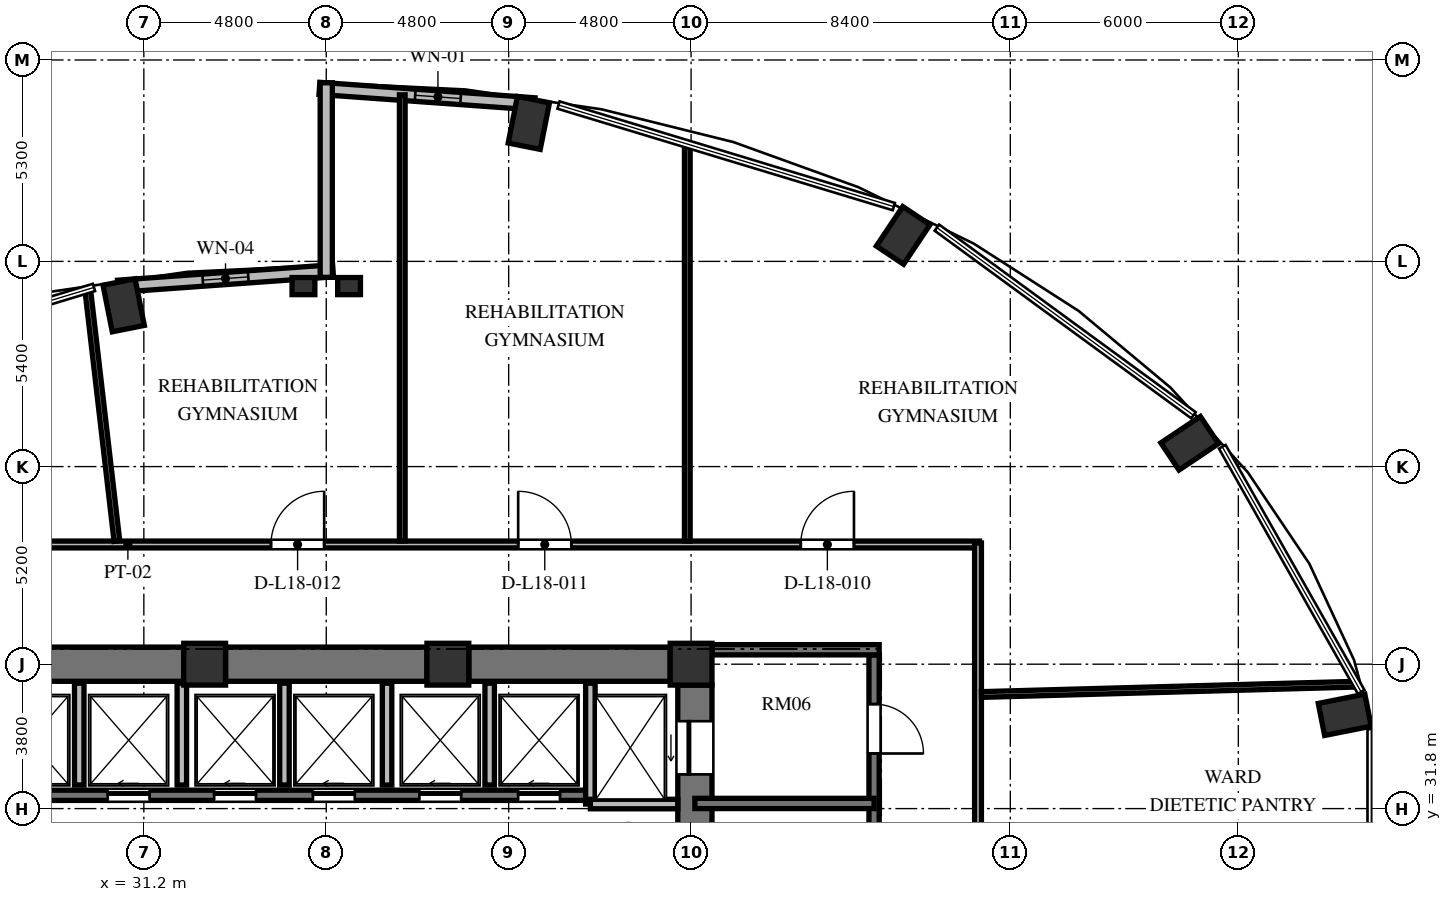
"""IFC4 building model, lengths in metres.
Left out: names, types, materials, properties, quantities, classifications, styles, units other than length and angle.
Written with IfcOpenShell. Run it as: python <this file> out.ifc"""

import sys

from ifc_helpers import new_model, si_unit, direction, frame, frame_2d, origin, origin_2d, place, context, subcontext, project, spatial, rectangle, extrude, element, fill, save


model = new_model("IFC4")
c1 = context("Model", 3, precision=1e-05, world=origin(), true_north=direction((0.0, 1.0)))
c2 = subcontext(c1, "Body", "Model", "MODEL_VIEW")
j1 = project(units=[si_unit("LENGTHUNIT", "METRE"), si_unit("PLANEANGLEUNIT", "RADIAN")], contexts=[c1])
p1 = place(None, origin())
s1 = spatial("IfcSite", under=j1, at=p1, CompositionType="ELEMENT")
p2 = place(p1, origin())
s2 = spatial("IfcBuilding", under=s1, at=p2, CompositionType="ELEMENT")
p3 = place(p2, frame((0.0, 0.0, 72.624)))
s3 = spatial("IfcBuildingStorey", under=s2, at=p3, CompositionType="ELEMENT", Elevation=72.624)
for number, where, z_axis, x_axis in (
    (1, (62.8, 34.268, 0.0), (0.0, 0.0, 1.0), (0.981, 0.195, 0.0)),
    (2, (58.72, 41.414, 0.0), (0.0, 0.0, 1.0), (0.831, 0.556, 0.0)),
    (3, (51.181, 46.884, 0.0), (0.0, 0.0, 1.0), (0.556, 0.831, 0.0)),
    (4, (41.331, 49.844, 0.0), (0.0, 0.0, 1.0), (0.195, 0.981, 0.0)),
    (5, (30.669, 45.044, 0.0), (0.0, 0.0, 1.0), (-0.195, 0.981, 0.0)),
):
    element("IfcColumn", number, at=place(p3, frame(where, z_axis=z_axis, x_axis=x_axis)), inside=s3, PredefinedType="COLUMN", context=c2, shape_type="SweptSolid", body=[
        extrude(rectangle(XDim=1.25, YDim=0.86, at=origin_2d()), origin(), (0.0, 0.0, 1.0), 3.648),
    ])
for number, where, z_axis, x_axis in (
    (6, (45.6, 35.6, 0.0), (0.0, 0.0, 1.0), (1.0, 0.0, 0.0)),
    (7, (39.2, 35.6, 0.0), (0.0, 0.0, 1.0), (1.0, 0.0, 0.0)),
    (8, (32.8, 35.6, 0.0), (0.0, 0.0, 1.0), (1.0, 0.0, 0.0)),
):
    element("IfcColumn", number, at=place(p3, frame(where, z_axis=z_axis, x_axis=x_axis)), inside=s3, PredefinedType="COLUMN", context=c2, shape_type="SweptSolid", body=[
        extrude(rectangle(XDim=1.1, YDim=1.1, at=origin_2d()), origin(), (0.0, 0.0, 1.0), 3.648),
    ])
for number, where, z_axis, x_axis in (
    (9, (35.4, 45.55, 0.0), (0.0, 0.0, 1.0), (1.0, 0.0, 0.0)),
    (10, (36.6, 45.55, 0.0), (0.0, 0.0, 1.0), (1.0, 0.0, 0.0)),
):
    element("IfcColumn", number, at=place(p3, frame(where, z_axis=z_axis, x_axis=x_axis)), inside=s3, PredefinedType="PILASTER", context=c2, shape_type="SweptSolid", body=[
        extrude(rectangle(XDim=0.6, YDim=0.45, at=origin_2d()), origin(), (0.0, 0.0, 1.0), 3.648),
    ])
p4 = place(p3, frame((45.7, 20.95, 0.0), z_axis=(0.0, 0.0, 1.0), x_axis=(0.0, 1.0, 0.0)))
e11 = element("IfcWall", 11, at=p4, inside=s3, PredefinedType="SHEAR", context=c2, shape_type="SweptSolid", body=[
    extrude(rectangle(XDim=14.1, YDim=0.9, at=frame_2d((7.05, 0.0))), origin(), (0.0, 0.0, 1.0), 3.648),
])
p5 = place(p4, frame((11.75, 0.0, 0.0)))
e12 = element("IfcOpeningElement", 12, at=p5, cuts=e11, PredefinedType="OPENING", context=c2, shape_type="SweptSolid", body=[
    extrude(rectangle(XDim=1.4, YDim=2.3, at=frame_2d((0.7, 1.15))), frame((0.0, 0.46, 0.0), z_axis=(0.0, -1.0, 0.0), x_axis=(1.0, 0.0, 0.0)), (0.0, 0.0, 1.0), 0.92),
])
p6 = place(p4, frame((0.95, 0.0, 0.0)))
e13 = element("IfcOpeningElement", 13, at=p6, cuts=e11, PredefinedType="OPENING", context=c2, shape_type="SweptSolid", body=[
    extrude(rectangle(XDim=1.4, YDim=2.3, at=frame_2d((0.7, 1.15))), frame((0.0, 0.46, 0.0), z_axis=(0.0, -1.0, 0.0), x_axis=(1.0, 0.0, 0.0)), (0.0, 0.0, 1.0), 0.92),
])
p7 = place(p3, frame((26.95, 35.6, 0.0), z_axis=(0.0, 0.0, 1.0), x_axis=(1.0, 0.0, 0.0)))
e14 = element("IfcWall", 14, at=p7, inside=s3, PredefinedType="SHEAR", context=c2, shape_type="SweptSolid", body=[
    extrude(rectangle(XDim=5.3, YDim=0.9, at=frame_2d((2.65, 0.0))), origin(), (0.0, 0.0, 1.0), 3.648),
])
p8 = place(p3, frame((33.35, 35.6, 0.0), z_axis=(0.0, 0.0, 1.0), x_axis=(1.0, 0.0, 0.0)))
e15 = element("IfcWall", 15, at=p8, inside=s3, PredefinedType="SHEAR", context=c2, shape_type="SweptSolid", body=[
    extrude(rectangle(XDim=5.3, YDim=0.9, at=frame_2d((2.65, 0.0))), origin(), (0.0, 0.0, 1.0), 3.648),
])
p9 = place(p3, frame((39.75, 35.6, 0.0), z_axis=(0.0, 0.0, 1.0), x_axis=(1.0, 0.0, 0.0)))
e16 = element("IfcWall", 16, at=p9, inside=s3, PredefinedType="SHEAR", context=c2, shape_type="SweptSolid", body=[
    extrude(rectangle(XDim=5.3, YDim=0.9, at=frame_2d((2.65, 0.0))), origin(), (0.0, 0.0, 1.0), 3.648),
])
p10 = place(p3, frame((41.481, 50.346, 0.0), z_axis=(0.0, 0.0, 1.0), x_axis=(-0.997422321809, 0.071754525696, 0.0)))
e17 = element("IfcWall", 17, at=p10, inside=s3, PredefinedType="SOLIDWALL", context=c2, shape_type="SweptSolid", body=[
    extrude(rectangle(XDim=5.675, YDim=0.32, at=frame_2d((2.838, 0.0))), origin(), (0.0, 0.0, 1.0), 3.198),
])
p11 = place(p10, frame((1.949, 0.0, 0.85)))
e18 = element("IfcOpeningElement", 18, at=p11, cuts=e17, PredefinedType="OPENING", context=c2, shape_type="SweptSolid", body=[
    extrude(rectangle(XDim=1.2, YDim=2.2, at=frame_2d((0.6, 1.1))), frame((0.0, 0.17, 0.0), z_axis=(0.0, -1.0, 0.0), x_axis=(1.0, 0.0, 0.0)), (0.0, 0.0, 1.0), 0.34),
])
p12 = place(p3, frame((36.179, 45.953, 0.0), z_axis=(0.0, 0.0, 1.0), x_axis=(-0.997421878774, -0.071760683825, 0.0)))
e19 = element("IfcWall", 19, at=p12, inside=s3, PredefinedType="SOLIDWALL", context=c2, shape_type="SweptSolid", body=[
    extrude(rectangle(XDim=5.675, YDim=0.32, at=frame_2d((2.837, 0.0))), origin(), (0.0, 0.0, 1.0), 3.198),
])
p13 = place(p12, frame((2.237, 0.0, 0.85)))
e20 = element("IfcOpeningElement", 20, at=p13, cuts=e19, PredefinedType="OPENING", context=c2, shape_type="SweptSolid", body=[
    extrude(rectangle(XDim=1.2, YDim=1.8, at=frame_2d((0.6, 0.9))), frame((0.0, 0.17, 0.0), z_axis=(0.0, -1.0, 0.0), x_axis=(1.0, 0.0, 0.0)), (0.0, 0.0, 1.0), 0.34),
])
p14 = place(p3, frame((36.0, 50.9, 0.0), z_axis=(0.0, 0.0, 1.0), x_axis=(0.0, -1.0, 0.0)))
e21 = element("IfcWall", 21, at=p14, inside=s3, PredefinedType="SOLIDWALL", context=c2, shape_type="SweptSolid", body=[
    extrude(rectangle(XDim=5.12, YDim=0.32, at=frame_2d((2.56, 0.0))), origin(), (0.0, 0.0, 1.0), 3.198),
])
p15 = place(p3, frame((26.55, 32.15, 0.0), z_axis=(0.0, 0.0, 1.0), x_axis=(1.0, 0.0, 0.0)))
e22 = element("IfcWall", 22, at=p15, inside=s3, PredefinedType="SHEAR", context=c2, shape_type="SweptSolid", body=[
    extrude(rectangle(XDim=16.4, YDim=0.27, at=frame_2d((8.2, 0.0))), origin(), (0.0, 0.0, 1.0), 3.648),
])
p16 = place(p15, frame((1.1, 0.0, 0.0)))
e23 = element("IfcOpeningElement", 23, at=p16, cuts=e22, PredefinedType="OPENING", context=c2, shape_type="SweptSolid", body=[
    extrude(rectangle(XDim=1.1, YDim=2.2, at=frame_2d((0.55, 1.1))), frame((0.0, 0.145, 0.0), z_axis=(0.0, -1.0, 0.0), x_axis=(1.0, 0.0, 0.0)), (0.0, 0.0, 1.0), 0.29),
])
p17 = place(p15, frame((3.7, 0.0, 0.0)))
e24 = element("IfcOpeningElement", 24, at=p17, cuts=e22, PredefinedType="OPENING", context=c2, shape_type="SweptSolid", body=[
    extrude(rectangle(XDim=1.1, YDim=2.2, at=frame_2d((0.55, 1.1))), frame((0.0, 0.145, 0.0), z_axis=(0.0, -1.0, 0.0), x_axis=(1.0, 0.0, 0.0)), (0.0, 0.0, 1.0), 0.29),
])
p18 = place(p15, frame((6.5, 0.0, 0.0)))
e25 = element("IfcOpeningElement", 25, at=p18, cuts=e22, PredefinedType="OPENING", context=c2, shape_type="SweptSolid", body=[
    extrude(rectangle(XDim=1.1, YDim=2.2, at=frame_2d((0.55, 1.1))), frame((0.0, 0.145, 0.0), z_axis=(0.0, -1.0, 0.0), x_axis=(1.0, 0.0, 0.0)), (0.0, 0.0, 1.0), 0.29),
])
p19 = place(p15, frame((9.1, 0.0, 0.0)))
e26 = element("IfcOpeningElement", 26, at=p19, cuts=e22, PredefinedType="OPENING", context=c2, shape_type="SweptSolid", body=[
    extrude(rectangle(XDim=1.1, YDim=2.2, at=frame_2d((0.55, 1.1))), frame((0.0, 0.145, 0.0), z_axis=(0.0, -1.0, 0.0), x_axis=(1.0, 0.0, 0.0)), (0.0, 0.0, 1.0), 0.29),
])
p20 = place(p15, frame((11.9, 0.0, 0.0)))
e27 = element("IfcOpeningElement", 27, at=p20, cuts=e22, PredefinedType="OPENING", context=c2, shape_type="SweptSolid", body=[
    extrude(rectangle(XDim=1.1, YDim=2.2, at=frame_2d((0.55, 1.1))), frame((0.0, 0.145, 0.0), z_axis=(0.0, -1.0, 0.0), x_axis=(1.0, 0.0, 0.0)), (0.0, 0.0, 1.0), 0.29),
])
p21 = place(p15, frame((14.5, 0.0, 0.0)))
e28 = element("IfcOpeningElement", 28, at=p21, cuts=e22, PredefinedType="OPENING", context=c2, shape_type="SweptSolid", body=[
    extrude(rectangle(XDim=1.1, YDim=2.2, at=frame_2d((0.55, 1.1))), frame((0.0, 0.145, 0.0), z_axis=(0.0, -1.0, 0.0), x_axis=(1.0, 0.0, 0.0)), (0.0, 0.0, 1.0), 0.29),
])
p22 = place(p3, frame((42.95, 31.92, 0.0), z_axis=(0.0, 0.0, 1.0), x_axis=(0.0, 1.0, 0.0)))
e29 = element("IfcWall", 29, at=p22, inside=s3, PredefinedType="SOLIDWALL", context=c2, shape_type="SweptSolid", body=[
    extrude(rectangle(XDim=3.18, YDim=0.25, at=frame_2d((1.59, 0.0))), origin(), (0.0, 0.0, 1.0), 3.198),
])
p23 = place(p3, frame((42.95, 31.92, 0.0), z_axis=(0.0, 0.0, 1.0), x_axis=(1.0, 0.0, 0.0)))
e30 = element("IfcWall", 30, at=p23, inside=s3, PredefinedType="SOLIDWALL", context=c2, shape_type="SweptSolid", body=[
    extrude(rectangle(XDim=2.3, YDim=0.25, at=frame_2d((1.15, 0.0))), origin(), (0.0, 0.0, 1.0), 3.198),
])
for number, where, z_axis, x_axis in (
    (31, (29.5, 32.42, 0.0), (0.0, 0.0, 1.0), (0.0, 1.0, 0.0)),
    (32, (32.2, 32.42, 0.0), (0.0, 0.0, 1.0), (0.0, 1.0, 0.0)),
    (33, (34.9, 32.42, 0.0), (0.0, 0.0, 1.0), (0.0, 1.0, 0.0)),
    (34, (37.6, 32.42, 0.0), (0.0, 0.0, 1.0), (0.0, 1.0, 0.0)),
    (35, (40.3, 32.42, 0.0), (0.0, 0.0, 1.0), (0.0, 1.0, 0.0)),
):
    element("IfcWall", number, at=place(p3, frame(where, z_axis=z_axis, x_axis=x_axis)), inside=s3, PredefinedType="SOLIDWALL", context=c2, shape_type="SweptSolid", body=[
        extrude(rectangle(XDim=2.68, YDim=0.25, at=frame_2d((1.34, 0.0))), origin(), (0.0, 0.0, 1.0), 3.198),
    ])
p24 = place(p3, frame((50.415, 35.845, 0.0), z_axis=(0.0, 0.0, 1.0), x_axis=(0.0, -1.0, 0.0)))
e36 = element("IfcWall", 36, at=p24, inside=s3, PredefinedType="SHEAR", context=c2, shape_type="SweptSolid", body=[
    extrude(rectangle(XDim=15.825, YDim=0.27, at=frame_2d((7.913, 0.0))), origin(), (0.0, 0.0, 1.0), 3.648),
])
p25 = place(p24, frame((4.445, 0.0, 0.0)))
e37 = element("IfcOpeningElement", 37, at=p25, cuts=e36, PredefinedType="OPENING", context=c2, shape_type="SweptSolid", body=[
    extrude(rectangle(XDim=1.2, YDim=2.15, at=frame_2d((0.6, 1.075))), frame((0.0, 0.145, 0.0), z_axis=(0.0, -1.0, 0.0), x_axis=(1.0, 0.0, 0.0)), (0.0, 0.0, 1.0), 0.29),
])
p26 = place(p24, frame((1.295, 0.0, 0.0)))
e38 = element("IfcOpeningElement", 38, at=p26, cuts=e36, PredefinedType="OPENING", context=c2, shape_type="SweptSolid", body=[
    extrude(rectangle(XDim=1.3, YDim=2.2, at=frame_2d((0.65, 1.1))), frame((0.0, 0.145, 0.0), z_axis=(0.0, -1.0, 0.0), x_axis=(1.0, 0.0, 0.0)), (0.0, 0.0, 1.0), 0.29),
])
p27 = place(p24, frame((13.095, 0.0, 0.0)))
e39 = element("IfcOpeningElement", 39, at=p27, cuts=e36, PredefinedType="OPENING", context=c2, shape_type="SweptSolid", body=[
    extrude(rectangle(XDim=1.3, YDim=2.2, at=frame_2d((0.65, 1.1))), frame((0.0, 0.145, 0.0), z_axis=(0.0, -1.0, 0.0), x_axis=(1.0, 0.0, 0.0)), (0.0, 0.0, 1.0), 0.29),
])
p28 = place(p3, frame((46.15, 35.98, 0.0), z_axis=(0.0, 0.0, 1.0), x_axis=(1.0, 0.0, 0.0)))
e40 = element("IfcWall", 40, at=p28, inside=s3, PredefinedType="SHEAR", context=c2, shape_type="SweptSolid", body=[
    extrude(rectangle(XDim=4.4, YDim=0.27, at=frame_2d((2.2, 0.0))), origin(), (0.0, 0.0, 1.0), 3.648),
])
p29 = place(p3, frame((45.7, 31.935, 0.0), z_axis=(0.0, 0.0, 1.0), x_axis=(1.0, 0.0, 0.0)))
e41 = element("IfcWall", 41, at=p29, inside=s3, PredefinedType="SHEAR", context=c2, shape_type="SweptSolid", body=[
    extrude(rectangle(XDim=4.715, YDim=0.27, at=frame_2d((2.357, 0.0))), origin(), (0.0, 0.0, 1.0), 3.648),
])
p30 = place(p3, frame((23.31, 38.75, 0.0), z_axis=(0.0, 0.0, 1.0), x_axis=(1.0, 0.0, 0.0)))
e42 = element("IfcWall", 42, at=p30, inside=s3, PredefinedType="PARTITIONING", context=c2, shape_type="SweptSolid", body=[
    extrude(rectangle(XDim=29.88, YDim=0.18, at=frame_2d((14.94, 0.0))), origin(), (0.0, 0.0, 1.0), 2.823),
])
p31 = place(p30, frame((25.176, 0.0, 0.0)))
e43 = element("IfcOpeningElement", 43, at=p31, cuts=e42, PredefinedType="OPENING", context=c2, shape_type="SweptSolid", body=[
    extrude(rectangle(XDim=1.4, YDim=2.2, at=frame_2d((0.7, 1.1))), frame((0.0, 0.1, 0.0), z_axis=(0.0, -1.0, 0.0), x_axis=(1.0, 0.0, 0.0)), (0.0, 0.0, 1.0), 0.2),
])
p32 = place(p30, frame((17.74, 0.0, 0.0)))
e44 = element("IfcOpeningElement", 44, at=p32, cuts=e42, PredefinedType="OPENING", context=c2, shape_type="SweptSolid", body=[
    extrude(rectangle(XDim=1.4, YDim=2.2, at=frame_2d((0.7, 1.1))), frame((0.0, 0.1, 0.0), z_axis=(0.0, -1.0, 0.0), x_axis=(1.0, 0.0, 0.0)), (0.0, 0.0, 1.0), 0.2),
])
p33 = place(p30, frame((11.236, 0.0, 0.0)))
e45 = element("IfcOpeningElement", 45, at=p33, cuts=e42, PredefinedType="OPENING", context=c2, shape_type="SweptSolid", body=[
    extrude(rectangle(XDim=1.4, YDim=2.2, at=frame_2d((0.7, 1.1))), frame((0.0, 0.1, 0.0), z_axis=(0.0, -1.0, 0.0), x_axis=(1.0, 0.0, 0.0)), (0.0, 0.0, 1.0), 0.2),
])
p34 = place(p3, frame((53.15, 38.79, 0.0), z_axis=(0.0, 0.0, 1.0), x_axis=(0.0, -1.0, 0.0)))
e46 = element("IfcWall", 46, at=p34, inside=s3, PredefinedType="PARTITIONING", context=c2, shape_type="SweptSolid", body=[
    extrude(rectangle(XDim=9.43, YDim=0.18, at=frame_2d((4.715, 0.0))), origin(), (0.0, 0.0, 1.0), 3.198),
])
p35 = place(p3, frame((53.24, 34.802, 0.0), z_axis=(0.0, 0.0, 1.0), x_axis=(0.999620561748, 0.027545099924, 0.0)))
e47 = element("IfcWall", 47, at=p35, inside=s3, PredefinedType="PARTITIONING", context=c2, shape_type="SweptSolid", body=[
    extrude(rectangle(XDim=9.891, YDim=0.15, at=frame_2d((4.946, 0.0))), origin(), (0.0, 0.0, 1.0), 2.583),
])
p36 = place(p3, frame((30.491, 38.84, 0.0), z_axis=(0.0, 0.0, 1.0), x_axis=(-0.115342161953, 0.993325820502, 0.0)))
e48 = element("IfcWall", 48, at=p36, inside=s3, PredefinedType="PARTITIONING", context=c2, shape_type="SweptSolid", body=[
    extrude(rectangle(XDim=6.672, YDim=0.15, at=frame_2d((3.336, 0.0))), origin(), (0.0, 0.0, 1.0), 3.198),
])
p37 = place(p3, frame((38.0, 38.84, 0.0), z_axis=(0.0, 0.0, 1.0), x_axis=(0.0, 1.0, 0.0)))
e49 = element("IfcWall", 49, at=p37, inside=s3, PredefinedType="PARTITIONING", context=c2, shape_type="SweptSolid", body=[
    extrude(rectangle(XDim=11.743, YDim=0.15, at=frame_2d((5.872, 0.0))), origin(), (0.0, 0.0, 1.0), 3.198),
])
p38 = place(p3, frame((45.5, 38.84, 0.0), z_axis=(0.0, 0.0, 1.0), x_axis=(0.0, 1.0, 0.0)))
e50 = element("IfcWall", 50, at=p38, inside=s3, PredefinedType="PARTITIONING", context=c2, shape_type="SweptSolid", body=[
    extrude(rectangle(XDim=10.436, YDim=0.15, at=frame_2d((5.218, 0.0))), origin(), (0.0, 0.0, 1.0), 3.198),
])
p39 = place(p11, origin())
e51 = element("IfcWindow", 51, at=p39, inside=s3, PartitioningType="SINGLE_PANEL", PredefinedType="WINDOW", context=c2, shape_type="SweptSolid", body=[
    extrude(rectangle(XDim=1.2, YDim=2.2, at=frame_2d((0.6, 1.1))), frame((0.0, 0.03, 0.0), z_axis=(0.0, -1.0, 0.0), x_axis=(1.0, 0.0, 0.0)), (0.0, 0.0, 1.0), 0.06),
])
fill(e18, e51)
p40 = place(p13, origin())
e52 = element("IfcWindow", 52, at=p40, inside=s3, PartitioningType="SINGLE_PANEL", PredefinedType="WINDOW", context=c2, shape_type="SweptSolid", body=[
    extrude(rectangle(XDim=1.2, YDim=1.8, at=frame_2d((0.6, 0.9))), frame((0.0, 0.03, 0.0), z_axis=(0.0, -1.0, 0.0), x_axis=(1.0, 0.0, 0.0)), (0.0, 0.0, 1.0), 0.06),
])
fill(e20, e52)
p41 = place(p17, origin())
e53 = element("IfcDoor", 53, at=p41, inside=s3, OperationType="SLIDING_TO_LEFT", PredefinedType="DOOR", context=c2, shape_type="SweptSolid", body=[
    extrude(rectangle(XDim=1.1, YDim=2.2, at=frame_2d((0.55, 1.1))), frame((0.0, 0.025, 0.0), z_axis=(0.0, -1.0, 0.0), x_axis=(1.0, 0.0, 0.0)), (0.0, 0.0, 1.0), 0.05),
])
fill(e24, e53)
p42 = place(p18, origin())
e54 = element("IfcDoor", 54, at=p42, inside=s3, OperationType="SLIDING_TO_LEFT", PredefinedType="DOOR", context=c2, shape_type="SweptSolid", body=[
    extrude(rectangle(XDim=1.1, YDim=2.2, at=frame_2d((0.55, 1.1))), frame((0.0, 0.025, 0.0), z_axis=(0.0, -1.0, 0.0), x_axis=(1.0, 0.0, 0.0)), (0.0, 0.0, 1.0), 0.05),
])
fill(e25, e54)
p43 = place(p19, origin())
e55 = element("IfcDoor", 55, at=p43, inside=s3, OperationType="SLIDING_TO_LEFT", PredefinedType="DOOR", context=c2, shape_type="SweptSolid", body=[
    extrude(rectangle(XDim=1.1, YDim=2.2, at=frame_2d((0.55, 1.1))), frame((0.0, 0.025, 0.0), z_axis=(0.0, -1.0, 0.0), x_axis=(1.0, 0.0, 0.0)), (0.0, 0.0, 1.0), 0.05),
])
fill(e26, e55)
p44 = place(p20, origin())
e56 = element("IfcDoor", 56, at=p44, inside=s3, OperationType="SLIDING_TO_LEFT", PredefinedType="DOOR", context=c2, shape_type="SweptSolid", body=[
    extrude(rectangle(XDim=1.1, YDim=2.2, at=frame_2d((0.55, 1.1))), frame((0.0, 0.025, 0.0), z_axis=(0.0, -1.0, 0.0), x_axis=(1.0, 0.0, 0.0)), (0.0, 0.0, 1.0), 0.05),
])
fill(e27, e56)
p45 = place(p21, origin())
e57 = element("IfcDoor", 57, at=p45, inside=s3, OperationType="SLIDING_TO_LEFT", PredefinedType="DOOR", context=c2, shape_type="SweptSolid", body=[
    extrude(rectangle(XDim=1.1, YDim=2.2, at=frame_2d((0.55, 1.1))), frame((0.0, 0.025, 0.0), z_axis=(0.0, -1.0, 0.0), x_axis=(1.0, 0.0, 0.0)), (0.0, 0.0, 1.0), 0.05),
])
fill(e28, e57)
p46 = place(p5, origin())
e58 = element("IfcDoor", 58, at=p46, inside=s3, OperationType="SLIDING_TO_LEFT", PredefinedType="DOOR", context=c2, shape_type="SweptSolid", body=[
    extrude(rectangle(XDim=1.4, YDim=2.3, at=frame_2d((0.7, 1.15))), frame((0.0, 0.025, 0.0), z_axis=(0.0, -1.0, 0.0), x_axis=(1.0, 0.0, 0.0)), (0.0, 0.0, 1.0), 0.05),
])
fill(e12, e58)
p47 = place(p26, origin())
e59 = element("IfcDoor", 59, at=p47, inside=s3, OperationType="SINGLE_SWING_RIGHT", PredefinedType="DOOR", context=c2, shape_type="SweptSolid", body=[
    extrude(rectangle(XDim=1.3, YDim=2.2, at=frame_2d((0.65, 1.1))), frame((0.0, 0.025, 0.0), z_axis=(0.0, -1.0, 0.0), x_axis=(1.0, 0.0, 0.0)), (0.0, 0.0, 1.0), 0.05),
])
fill(e38, e59)
p48 = place(p31, origin())
e60 = element("IfcDoor", 60, at=p48, inside=s3, OperationType="SINGLE_SWING_RIGHT", PredefinedType="DOOR", context=c2, shape_type="SweptSolid", body=[
    extrude(rectangle(XDim=1.4, YDim=2.2, at=frame_2d((0.7, 1.1))), frame((0.0, 0.025, 0.0), z_axis=(0.0, -1.0, 0.0), x_axis=(1.0, 0.0, 0.0)), (0.0, 0.0, 1.0), 0.05),
])
fill(e43, e60)
p49 = place(p32, origin())
e61 = element("IfcDoor", 61, at=p49, inside=s3, OperationType="SINGLE_SWING_LEFT", PredefinedType="DOOR", context=c2, shape_type="SweptSolid", body=[
    extrude(rectangle(XDim=1.4, YDim=2.2, at=frame_2d((0.7, 1.1))), frame((0.0, 0.025, 0.0), z_axis=(0.0, -1.0, 0.0), x_axis=(1.0, 0.0, 0.0)), (0.0, 0.0, 1.0), 0.05),
])
fill(e44, e61)
p50 = place(p33, origin())
e62 = element("IfcDoor", 62, at=p50, inside=s3, OperationType="SINGLE_SWING_RIGHT", PredefinedType="DOOR", context=c2, shape_type="SweptSolid", body=[
    extrude(rectangle(XDim=1.4, YDim=2.2, at=frame_2d((0.7, 1.1))), frame((0.0, 0.025, 0.0), z_axis=(0.0, -1.0, 0.0), x_axis=(1.0, 0.0, 0.0)), (0.0, 0.0, 1.0), 0.05),
])
fill(e45, e62)
save(model, sys.argv[1])
